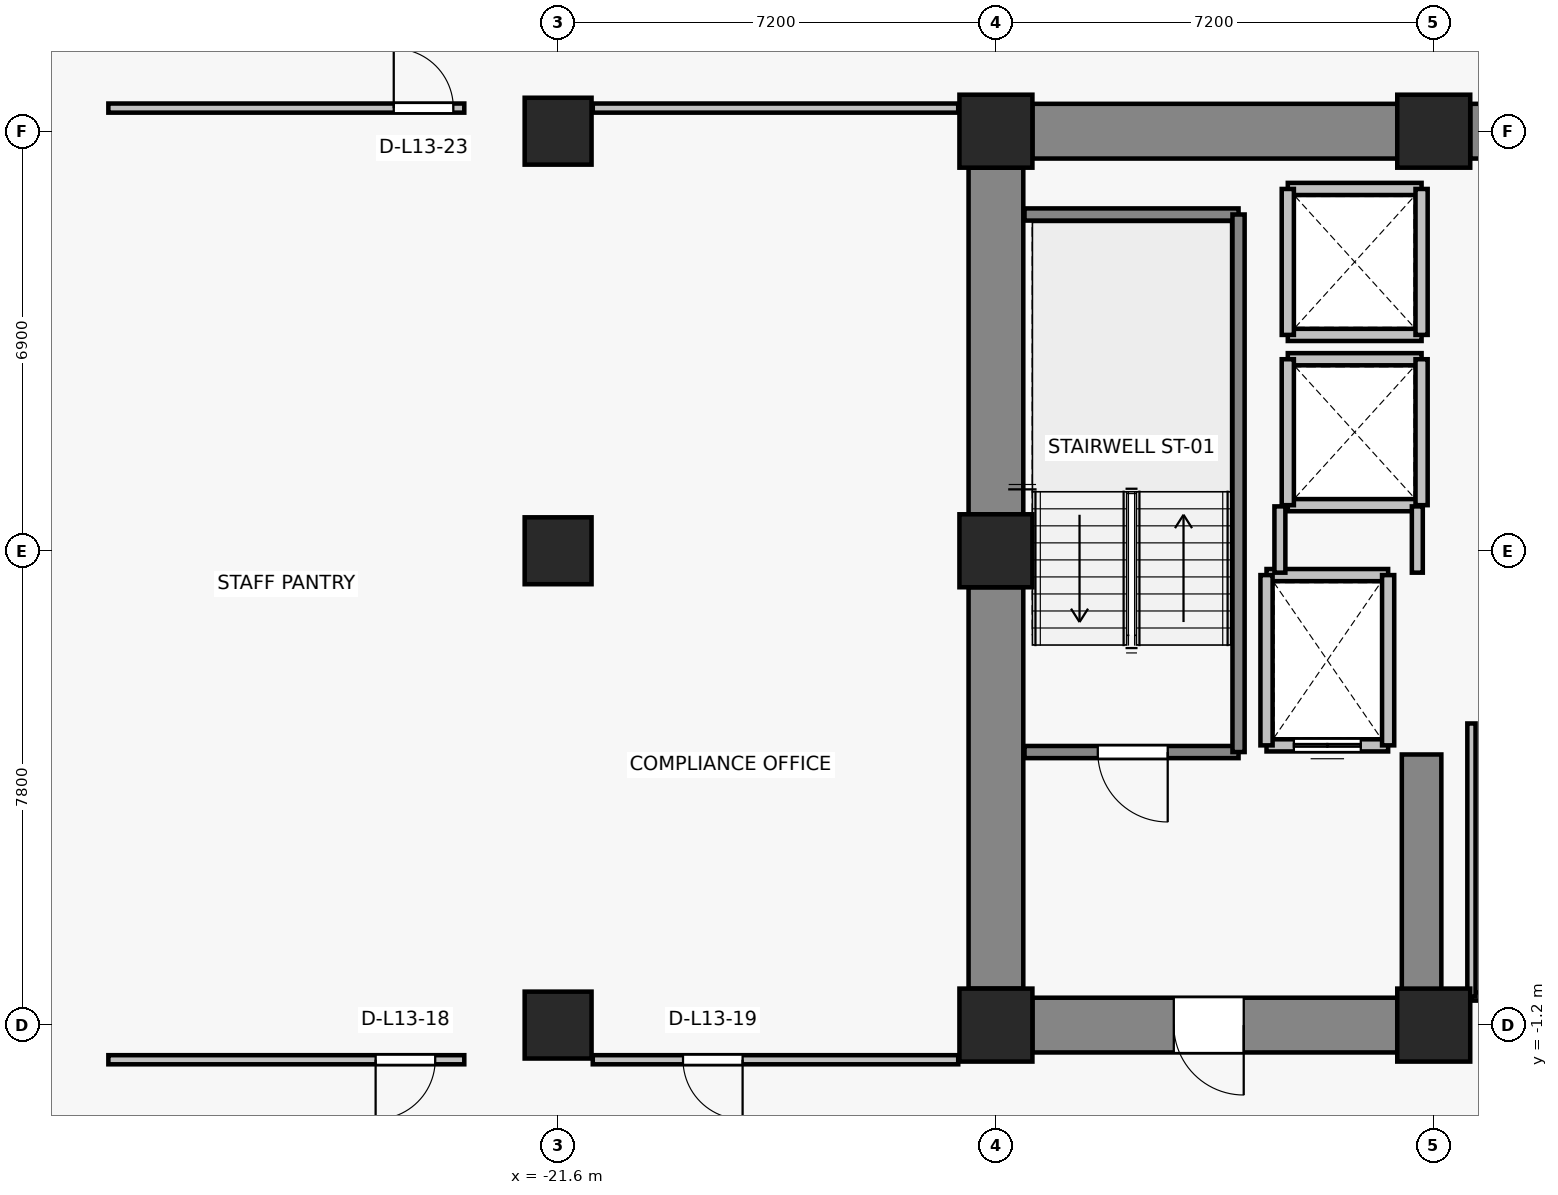
"""IFC4 building model, lengths in metres.
Left out: names, types, materials, properties, quantities, classifications, styles, units other than length and angle.
Written with IfcOpenShell. Run it as: python <this file> out.ifc"""

import sys

from ifc_helpers import new_model, si_unit, direction, frame, frame_2d, origin, origin_2d, place, context, subcontext, project, spatial, rectangle, extrude, source, transform, mapped, element, fill, save


model = new_model("IFC4")
c1 = context("Model", 3, precision=1e-05, world=origin(), true_north=direction((0.0, 1.0)))
c2 = subcontext(c1, "Body", "Model", "MODEL_VIEW")
j1 = project(units=[si_unit("LENGTHUNIT", "METRE"), si_unit("PLANEANGLEUNIT", "RADIAN")], contexts=[c1])
p1 = place(None, origin())
s1 = spatial("IfcSite", under=j1, at=p1, CompositionType="ELEMENT")
p2 = place(p1, origin())
s2 = spatial("IfcBuilding", under=s1, at=p2, CompositionType="ELEMENT")
p3 = place(p2, frame((0.0, 0.0, 50.5)))
s3 = spatial("IfcBuildingStorey", under=s2, at=p3, CompositionType="ELEMENT", Elevation=50.5)
for number, where, z_axis, x_axis in (
    (1, (-14.4, -1.2, 0.0), (0.0, 0.0, 1.0), (1.0, 0.0, 0.0)),
    (2, (-7.2, -1.2, 0.0), (0.0, 0.0, 1.0), (1.0, 0.0, 0.0)),
    (3, (-14.4, 6.6, 0.0), (0.0, 0.0, 1.0), (1.0, 0.0, 0.0)),
    (4, (-14.4, 13.5, 0.0), (0.0, 0.0, 1.0), (1.0, 0.0, 0.0)),
    (5, (-7.2, 13.5, 0.0), (0.0, 0.0, 1.0), (1.0, 0.0, 0.0)),
):
    element("IfcColumn", number, at=place(p3, frame(where, z_axis=z_axis, x_axis=x_axis)), inside=s3, PredefinedType="COLUMN", context=c2, shape_type="SweptSolid", body=[
        extrude(rectangle(XDim=1.2, YDim=1.2, at=origin_2d()), origin(), (0.0, 0.0, 1.0), 3.3),
    ])
for number, where, z_axis, x_axis in (
    (6, (-21.6, -1.2, 0.0), (0.0, 0.0, 1.0), (1.0, 0.0, 0.0)),
    (7, (-21.6, 6.6, 0.0), (0.0, 0.0, 1.0), (1.0, 0.0, 0.0)),
    (8, (-21.6, 13.5, 0.0), (0.0, 0.0, 1.0), (1.0, 0.0, 0.0)),
):
    element("IfcColumn", number, at=place(p3, frame(where, z_axis=z_axis, x_axis=x_axis)), inside=s3, PredefinedType="COLUMN", context=c2, shape_type="SweptSolid", body=[
        extrude(rectangle(XDim=1.1, YDim=1.1, at=origin_2d()), origin(), (0.0, 0.0, 1.0), 3.3),
    ])
p4 = place(p3, frame((-13.8, 13.5, 0.0), z_axis=(0.0, 0.0, 1.0), x_axis=(1.0, 0.0, 0.0)))
e9 = element("IfcWall", 9, at=p4, inside=s3, PredefinedType="SHEAR", context=c2, shape_type="SweptSolid", body=[
    extrude(rectangle(XDim=6.0, YDim=0.9, at=frame_2d((3.0, 0.0))), origin(), (0.0, 0.0, 1.0), 3.075),
])
p5 = place(p3, frame((-6.6, 13.5, 0.0), z_axis=(0.0, 0.0, 1.0), x_axis=(1.0, 0.0, 0.0)))
e10 = element("IfcWall", 10, at=p5, inside=s3, PredefinedType="SHEAR", context=c2, shape_type="SweptSolid", body=[
    extrude(rectangle(XDim=13.2, YDim=0.9, at=frame_2d((6.6, 0.0))), origin(), (0.0, 0.0, 1.0), 3.075),
])
p6 = place(p3, frame((-14.4, -0.6, 0.0), z_axis=(0.0, 0.0, 1.0), x_axis=(0.0, 1.0, 0.0)))
e11 = element("IfcWall", 11, at=p6, inside=s3, PredefinedType="SHEAR", context=c2, shape_type="SweptSolid", body=[
    extrude(rectangle(XDim=6.6, YDim=0.9, at=frame_2d((3.3, 0.0))), origin(), (0.0, 0.0, 1.0), 3.075),
])
p7 = place(p3, frame((-14.4, 7.2, 0.0), z_axis=(0.0, 0.0, 1.0), x_axis=(0.0, 1.0, 0.0)))
e12 = element("IfcWall", 12, at=p7, inside=s3, PredefinedType="SHEAR", context=c2, shape_type="SweptSolid", body=[
    extrude(rectangle(XDim=5.7, YDim=0.9, at=frame_2d((2.85, 0.0))), origin(), (0.0, 0.0, 1.0), 3.075),
])
p8 = place(p3, frame((-7.8, -1.2, 0.0), z_axis=(0.0, 0.0, 1.0), x_axis=(-1.0, 0.0, 0.0)))
e13 = element("IfcWall", 13, at=p8, inside=s3, PredefinedType="SHEAR", context=c2, shape_type="SweptSolid", body=[
    extrude(rectangle(XDim=6.0, YDim=0.9, at=frame_2d((3.0, 0.0))), origin(), (0.0, 0.0, 1.0), 3.075),
])
p9 = place(p8, frame((2.525, 0.0, 0.0)))
e14 = element("IfcOpeningElement", 14, at=p9, cuts=e13, PredefinedType="OPENING", context=c2, shape_type="SweptSolid", body=[
    extrude(rectangle(XDim=1.15, YDim=2.15, at=frame_2d((0.575, 1.075))), frame((0.0, 0.46, 0.0), z_axis=(0.0, -1.0, 0.0), x_axis=(1.0, 0.0, 0.0)), (0.0, 0.0, 1.0), 0.92),
])
p10 = place(p3, frame((-7.4, -0.75, 0.0), z_axis=(0.0, 0.0, 1.0), x_axis=(0.0, 1.0, 0.0)))
e15 = element("IfcWall", 15, at=p10, inside=s3, PredefinedType="SHEAR", context=c2, shape_type="SweptSolid", body=[
    extrude(rectangle(XDim=4.0, YDim=0.65, at=frame_2d((2.0, 0.0))), origin(), (0.0, 0.0, 1.0), 3.075),
])
p11 = place(p3, frame((-7.95, 3.4, 0.0), z_axis=(0.0, 0.0, 1.0), x_axis=(-1.0, 0.0, 0.0)))
e16 = element("IfcWall", 16, at=p11, inside=s3, PredefinedType="SOLIDWALL", context=c2, shape_type="SweptSolid", body=[
    extrude(rectangle(XDim=2.0, YDim=0.2, at=frame_2d((1.0, 0.0))), origin(), (0.0, 0.0, 1.0), 3.075),
])
p12 = place(p11, frame((0.45, 0.0, 0.0)))
e17 = element("IfcOpeningElement", 17, at=p12, cuts=e16, PredefinedType="OPENING", context=c2, shape_type="SweptSolid", body=[
    extrude(rectangle(XDim=1.1, YDim=2.2, at=frame_2d((0.55, 1.1))), frame((0.0, 0.11, 0.0), z_axis=(0.0, -1.0, 0.0), x_axis=(1.0, 0.0, 0.0)), (0.0, 0.0, 1.0), 0.22),
])
p13 = place(p3, frame((-9.95, 6.2, 0.0), z_axis=(0.0, 0.0, 1.0), x_axis=(1.0, 0.0, 0.0)))
e18 = element("IfcWall", 18, at=p13, inside=s3, PredefinedType="SOLIDWALL", context=c2, shape_type="SweptSolid", body=[
    extrude(rectangle(XDim=2.0, YDim=0.2, at=frame_2d((1.0, 0.0))), origin(), (0.0, 0.0, 1.0), 3.075),
])
for number, where, z_axis, x_axis in (
    (19, (-9.95, 3.4, 0.0), (0.0, 0.0, 1.0), (0.0, 1.0, 0.0)),
    (20, (-7.95, 6.2, 0.0), (0.0, 0.0, 1.0), (0.0, -1.0, 0.0)),
):
    element("IfcWall", number, at=place(p3, frame(where, z_axis=z_axis, x_axis=x_axis)), inside=s3, PredefinedType="SOLIDWALL", context=c2, shape_type="SweptSolid", body=[
        extrude(rectangle(XDim=2.8, YDim=0.2, at=frame_2d((1.4, 0.0))), origin(), (0.0, 0.0, 1.0), 3.075),
    ])
for number, where, z_axis, x_axis in (
    (21, (-7.4, 7.35, 0.0), (0.0, 0.0, 1.0), (-1.0, 0.0, 0.0)),
    (22, (-9.6, 9.75, 0.0), (0.0, 0.0, 1.0), (1.0, 0.0, 0.0)),
):
    element("IfcWall", number, at=place(p3, frame(where, z_axis=z_axis, x_axis=x_axis)), inside=s3, PredefinedType="SOLIDWALL", context=c2, shape_type="SweptSolid", body=[
        extrude(rectangle(XDim=2.2, YDim=0.2, at=frame_2d((1.1, 0.0))), origin(), (0.0, 0.0, 1.0), 2.465),
    ])
p14 = place(p3, frame((-9.6, 7.35, 0.0), z_axis=(0.0, 0.0, 1.0), x_axis=(0.0, 1.0, 0.0)))
e23 = element("IfcWall", 23, at=p14, inside=s3, PredefinedType="SOLIDWALL", context=c2, shape_type="SweptSolid", body=[
    extrude(rectangle(XDim=2.4, YDim=0.2, at=frame_2d((1.2, 0.0))), origin(), (0.0, 0.0, 1.0), 3.075),
])
p15 = place(p3, frame((-7.4, 9.75, 0.0), z_axis=(0.0, 0.0, 1.0), x_axis=(0.0, -1.0, 0.0)))
e24 = element("IfcWall", 24, at=p15, inside=s3, PredefinedType="SOLIDWALL", context=c2, shape_type="SweptSolid", body=[
    extrude(rectangle(XDim=2.4, YDim=0.2, at=frame_2d((1.2, 0.0))), origin(), (0.0, 0.0, 1.0), 2.465),
])
for number, where, z_axis, x_axis in (
    (25, (-7.4, 10.15, 0.0), (0.0, 0.0, 1.0), (-1.0, 0.0, 0.0)),
    (26, (-9.6, 12.55, 0.0), (0.0, 0.0, 1.0), (1.0, 0.0, 0.0)),
):
    element("IfcWall", number, at=place(p3, frame(where, z_axis=z_axis, x_axis=x_axis)), inside=s3, PredefinedType="SOLIDWALL", context=c2, shape_type="SweptSolid", body=[
        extrude(rectangle(XDim=2.2, YDim=0.2, at=frame_2d((1.1, 0.0))), origin(), (0.0, 0.0, 1.0), 2.465),
    ])
p16 = place(p3, frame((-9.6, 10.15, 0.0), z_axis=(0.0, 0.0, 1.0), x_axis=(0.0, 1.0, 0.0)))
e27 = element("IfcWall", 27, at=p16, inside=s3, PredefinedType="SOLIDWALL", context=c2, shape_type="SweptSolid", body=[
    extrude(rectangle(XDim=2.4, YDim=0.2, at=frame_2d((1.2, 0.0))), origin(), (0.0, 0.0, 1.0), 3.075),
])
p17 = place(p3, frame((-7.4, 12.55, 0.0), z_axis=(0.0, 0.0, 1.0), x_axis=(0.0, -1.0, 0.0)))
e28 = element("IfcWall", 28, at=p17, inside=s3, PredefinedType="SOLIDWALL", context=c2, shape_type="SweptSolid", body=[
    extrude(rectangle(XDim=2.4, YDim=0.2, at=frame_2d((1.2, 0.0))), origin(), (0.0, 0.0, 1.0), 2.465),
])
p18 = place(p3, frame((-10.41, 3.29, 0.0), z_axis=(0.0, 0.0, 1.0), x_axis=(-1.0, 0.0, 0.0)))
e29 = element("IfcWall", 29, at=p18, inside=s3, PredefinedType="SOLIDWALL", context=c2, shape_type="SweptSolid", body=[
    extrude(rectangle(XDim=3.52, YDim=0.2, at=frame_2d((1.76, 0.0))), origin(), (0.0, 0.0, 1.0), 3.075),
])
p19 = place(p18, frame((1.165, 0.0, 0.0)))
e30 = element("IfcOpeningElement", 30, at=p19, cuts=e29, PredefinedType="OPENING", context=c2, shape_type="SweptSolid", body=[
    extrude(rectangle(XDim=1.15, YDim=2.15, at=frame_2d((0.575, 1.075))), frame((0.0, 0.11, 0.0), z_axis=(0.0, -1.0, 0.0), x_axis=(1.0, 0.0, 0.0)), (0.0, 0.0, 1.0), 0.22),
])
p20 = place(p3, frame((-13.93, 12.13, 0.0), z_axis=(0.0, 0.0, 1.0), x_axis=(1.0, 0.0, 0.0)))
e31 = element("IfcWall", 31, at=p20, inside=s3, PredefinedType="SOLIDWALL", context=c2, shape_type="SweptSolid", body=[
    extrude(rectangle(XDim=3.52, YDim=0.2, at=frame_2d((1.76, 0.0))), origin(), (0.0, 0.0, 1.0), 3.075),
])
p21 = place(p3, frame((-10.41, 12.13, 0.0), z_axis=(0.0, 0.0, 1.0), x_axis=(0.0, -1.0, 0.0)))
e32 = element("IfcWall", 32, at=p21, inside=s3, PredefinedType="SOLIDWALL", context=c2, shape_type="SweptSolid", body=[
    extrude(rectangle(XDim=8.84, YDim=0.2, at=frame_2d((4.42, 0.0))), origin(), (0.0, 0.0, 1.0), 3.075),
])
p22 = place(p3, frame((-9.73, 6.24, 0.0), z_axis=(0.0, 0.0, 1.0), x_axis=(0.0, 1.0, 0.0)))
e33 = element("IfcWall", 33, at=p22, inside=s3, PredefinedType="PARTITIONING", context=c2, shape_type="SweptSolid", body=[
    extrude(rectangle(XDim=1.09, YDim=0.18, at=frame_2d((0.545, 0.0))), origin(), (0.0, 0.0, 1.0), 3.075),
])
p23 = place(p3, frame((-7.47, 7.33, 0.0), z_axis=(0.0, 0.0, 1.0), x_axis=(0.0, -1.0, 0.0)))
e34 = element("IfcWall", 34, at=p23, inside=s3, PredefinedType="PARTITIONING", context=c2, shape_type="SweptSolid", body=[
    extrude(rectangle(XDim=1.09, YDim=0.18, at=frame_2d((0.545, 0.0))), origin(), (0.0, 0.0, 1.0), 2.465),
])
p24 = place(p3, frame((-3.47, -0.73, 0.0), z_axis=(0.0, 0.0, 1.0), x_axis=(-1.0, 0.0, 0.0)))
e35 = element("IfcWall", 35, at=p24, inside=s3, PredefinedType="PARTITIONING", context=c2, shape_type="SweptSolid", body=[
    extrude(rectangle(XDim=3.11, YDim=0.135, at=frame_2d((1.555, 0.0))), origin(), (0.0, 0.0, 1.0), 3.075),
])
p25 = place(p24, frame((1.09, 0.0, 0.0)))
e36 = element("IfcOpeningElement", 36, at=p25, cuts=e35, PredefinedType="OPENING", context=c2, shape_type="SweptSolid", body=[
    extrude(rectangle(XDim=0.92, YDim=2.1, at=frame_2d((0.46, 1.05))), frame((0.0, 0.077, 0.0), z_axis=(0.0, -1.0, 0.0), x_axis=(1.0, 0.0, 0.0)), (0.0, 0.0, 1.0), 0.155),
])
p26 = place(p3, frame((-6.58, -0.73, 0.0), z_axis=(0.0, 0.0, 1.0), x_axis=(0.0, 1.0, 0.0)))
e37 = element("IfcWall", 37, at=p26, inside=s3, PredefinedType="PARTITIONING", context=c2, shape_type="SweptSolid", body=[
    extrude(rectangle(XDim=4.49, YDim=0.135, at=frame_2d((2.245, 0.0))), origin(), (0.0, 0.0, 1.0), 3.075),
])
p27 = place(p3, frame((-23.143, -1.77, 0.0), z_axis=(0.0, 0.0, 1.0), x_axis=(-1.0, 0.0, 0.0)))
e38 = element("IfcWall", 38, at=p27, inside=s3, PredefinedType="PARTITIONING", context=c2, shape_type="SweptSolid", body=[
    extrude(rectangle(XDim=5.853, YDim=0.15, at=frame_2d((2.927, 0.0))), origin(), (0.0, 0.0, 1.0), 2.465),
])
p28 = place(p27, frame((0.478, 0.0, 0.0)))
e39 = element("IfcOpeningElement", 39, at=p28, cuts=e38, PredefinedType="OPENING", context=c2, shape_type="SweptSolid", body=[
    extrude(rectangle(XDim=0.98, YDim=2.15, at=frame_2d((0.49, 1.075))), frame((0.0, 0.085, 0.0), z_axis=(0.0, -1.0, 0.0), x_axis=(1.0, 0.0, 0.0)), (0.0, 0.0, 1.0), 0.17),
])
p29 = place(p3, frame((-28.996, 13.88, 0.0), z_axis=(0.0, 0.0, 1.0), x_axis=(1.0, 0.0, 0.0)))
e40 = element("IfcWall", 40, at=p29, inside=s3, PredefinedType="PARTITIONING", context=c2, shape_type="SweptSolid", body=[
    extrude(rectangle(XDim=5.853, YDim=0.15, at=frame_2d((2.927, 0.0))), origin(), (0.0, 0.0, 1.0), 3.075),
])
p30 = place(p29, frame((4.693, 0.0, 0.0)))
e41 = element("IfcOpeningElement", 41, at=p30, cuts=e40, PredefinedType="OPENING", context=c2, shape_type="SweptSolid", body=[
    extrude(rectangle(XDim=0.98, YDim=2.15, at=frame_2d((0.49, 1.075))), frame((0.0, 0.085, 0.0), z_axis=(0.0, -1.0, 0.0), x_axis=(1.0, 0.0, 0.0)), (0.0, 0.0, 1.0), 0.17),
])
p31 = place(p3, frame((-15.02, -1.77, 0.0), z_axis=(0.0, 0.0, 1.0), x_axis=(-1.0, 0.0, 0.0)))
e42 = element("IfcWall", 42, at=p31, inside=s3, PredefinedType="PARTITIONING", context=c2, shape_type="SweptSolid", body=[
    extrude(rectangle(XDim=6.01, YDim=0.15, at=frame_2d((3.005, 0.0))), origin(), (0.0, 0.0, 1.0), 3.075),
])
p32 = place(p31, frame((3.546, 0.0, 0.0)))
e43 = element("IfcOpeningElement", 43, at=p32, cuts=e42, PredefinedType="OPENING", context=c2, shape_type="SweptSolid", body=[
    extrude(rectangle(XDim=0.98, YDim=2.15, at=frame_2d((0.49, 1.075))), frame((0.0, 0.085, 0.0), z_axis=(0.0, -1.0, 0.0), x_axis=(1.0, 0.0, 0.0)), (0.0, 0.0, 1.0), 0.17),
])
p33 = place(p3, frame((-21.03, 13.88, 0.0), z_axis=(0.0, 0.0, 1.0), x_axis=(1.0, 0.0, 0.0)))
e44 = element("IfcWall", 44, at=p33, inside=s3, PredefinedType="PARTITIONING", context=c2, shape_type="SweptSolid", body=[
    extrude(rectangle(XDim=6.01, YDim=0.15, at=frame_2d((3.005, 0.0))), origin(), (0.0, 0.0, 1.0), 3.075),
])
m1 = source(origin(), c2, "Body", "SweptSolid", [
    extrude(rectangle(XDim=1.1, YDim=2.2, at=frame_2d((0.55, 1.1))), frame((0.0, 0.025, 0.0), z_axis=(0.0, -1.0, 0.0), x_axis=(1.0, 0.0, 0.0)), (0.0, 0.0, 1.0), 0.05),
])
p34 = place(p12, origin())
e45 = element("IfcDoor", 45, at=p34, inside=s3, OperationType="DOUBLE_DOOR_SLIDING", PredefinedType="DOOR", context=c2, shape_type="MappedRepresentation", body=[
    mapped(m1, transform((0.0, 0.0, 0.0), x_axis=(1.0, 0.0, 0.0), y_axis=(0.0, 1.0, 0.0), z_axis=(0.0, 0.0, 1.0), scale=1.0)),
])
fill(e17, e45)
m2 = source(origin(), c2, "Body", "SweptSolid", [
    extrude(rectangle(XDim=1.15, YDim=2.15, at=frame_2d((0.575, 1.075))), frame((0.0, 0.025, 0.0), z_axis=(0.0, -1.0, 0.0), x_axis=(1.0, 0.0, 0.0)), (0.0, 0.0, 1.0), 0.05),
])
p35 = place(p19, origin())
e46 = element("IfcDoor", 46, at=p35, inside=s3, OperationType="SINGLE_SWING_LEFT", PredefinedType="DOOR", context=c2, shape_type="MappedRepresentation", body=[
    mapped(m2, transform((0.0, 0.0, 0.0), x_axis=(1.0, 0.0, 0.0), y_axis=(0.0, 1.0, 0.0), z_axis=(0.0, 0.0, 1.0), scale=1.0)),
])
fill(e30, e46)
p36 = place(p9, origin())
e47 = element("IfcDoor", 47, at=p36, inside=s3, OperationType="SINGLE_SWING_LEFT", PredefinedType="DOOR", context=c2, shape_type="MappedRepresentation", body=[
    mapped(m2, transform((0.0, 0.0, 0.0), x_axis=(1.0, 0.0, 0.0), y_axis=(0.0, 1.0, 0.0), z_axis=(0.0, 0.0, 1.0), scale=1.0)),
])
fill(e14, e47)
m3 = source(origin(), c2, "Body", "SweptSolid", [
    extrude(rectangle(XDim=0.98, YDim=2.15, at=frame_2d((0.49, 1.075))), frame((0.0, 0.025, 0.0), z_axis=(0.0, -1.0, 0.0), x_axis=(1.0, 0.0, 0.0)), (0.0, 0.0, 1.0), 0.05),
])
p37 = place(p28, origin())
e48 = element("IfcDoor", 48, at=p37, inside=s3, OperationType="SINGLE_SWING_RIGHT", PredefinedType="DOOR", context=c2, shape_type="MappedRepresentation", body=[
    mapped(m3, transform((0.0, 0.0, 0.0), x_axis=(1.0, 0.0, 0.0), y_axis=(0.0, 1.0, 0.0), z_axis=(0.0, 0.0, 1.0), scale=1.0)),
])
fill(e39, e48)
p38 = place(p32, origin())
e49 = element("IfcDoor", 49, at=p38, inside=s3, OperationType="SINGLE_SWING_LEFT", PredefinedType="DOOR", context=c2, shape_type="MappedRepresentation", body=[
    mapped(m3, transform((0.0, 0.0, 0.0), x_axis=(1.0, 0.0, 0.0), y_axis=(0.0, 1.0, 0.0), z_axis=(0.0, 0.0, 1.0), scale=1.0)),
])
fill(e43, e49)
p39 = place(p30, origin())
e50 = element("IfcDoor", 50, at=p39, inside=s3, OperationType="SINGLE_SWING_LEFT", PredefinedType="DOOR", context=c2, shape_type="MappedRepresentation", body=[
    mapped(m3, transform((0.0, 0.0, 0.0), x_axis=(1.0, 0.0, 0.0), y_axis=(0.0, 1.0, 0.0), z_axis=(0.0, 0.0, 1.0), scale=1.0)),
])
fill(e41, e50)
save(model, sys.argv[1])
